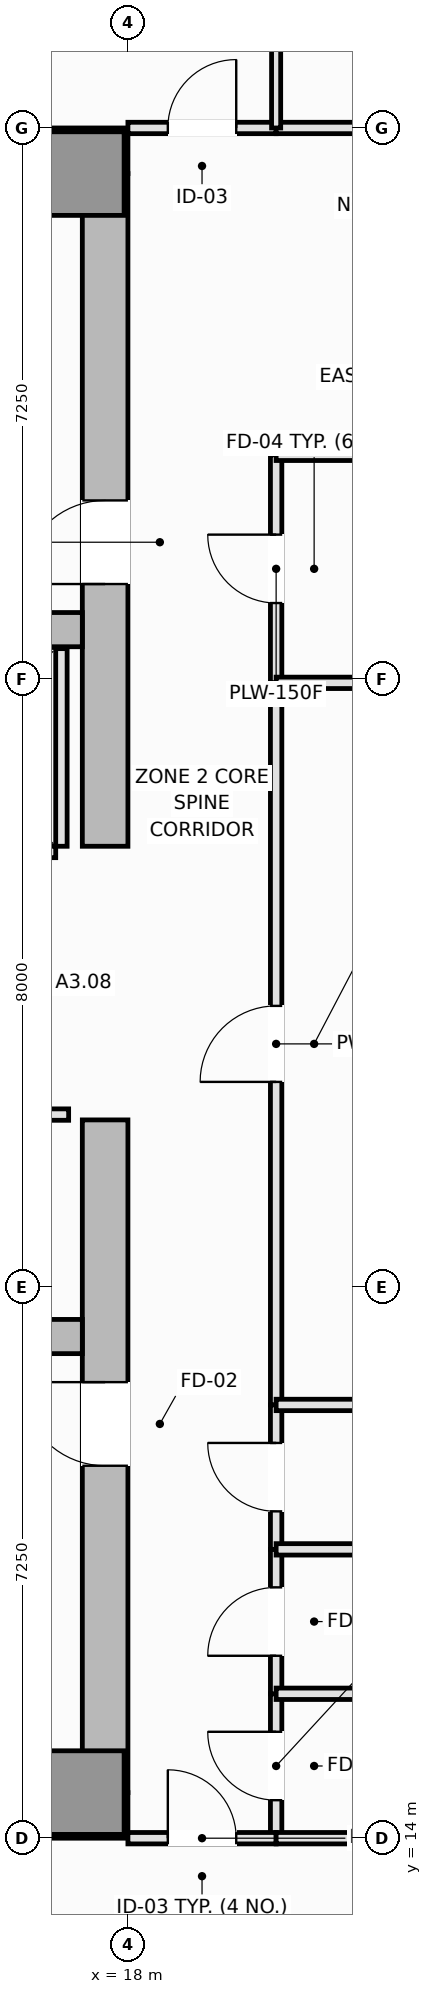
"""IFC4 building model, lengths in metres.
Left out: names, types, materials, properties, quantities, classifications, styles, units other than length and angle.
Written with IfcOpenShell. Run it as: python <this file> out.ifc"""

import sys

from ifc_helpers import new_model, si_unit, direction, frame, frame_2d, origin, origin_2d, place, context, subcontext, project, spatial, rectangle, extrude, element, fill, save


model = new_model("IFC4")
c1 = context("Model", 3, precision=1e-05, world=origin(), true_north=direction((0.0, 1.0)))
c2 = subcontext(c1, "Body", "Model", "MODEL_VIEW")
j1 = project(units=[si_unit("LENGTHUNIT", "METRE"), si_unit("PLANEANGLEUNIT", "RADIAN")], contexts=[c1])
p1 = place(None, origin())
s1 = spatial("IfcSite", under=j1, at=p1, CompositionType="ELEMENT")
p2 = place(p1, origin())
s2 = spatial("IfcBuilding", under=s1, at=p2, CompositionType="ELEMENT")
p3 = place(p2, frame((0.0, 0.0, 116.45)))
s3 = spatial("IfcBuildingStorey", under=s2, at=p3, CompositionType="ELEMENT", Elevation=116.45)
for number, where, z_axis, x_axis in (
    (1, (4.5, 14.3, 0.0), (0.0, 0.0, 1.0), (1.0, 0.0, 0.0)),
    (2, (4.5, 36.2, 0.0), (0.0, 0.0, 1.0), (1.0, 0.0, 0.0)),
):
    element("IfcWall", number, at=place(p3, frame(where, z_axis=z_axis, x_axis=x_axis)), inside=s3, PredefinedType="SHEAR", context=c2, shape_type="SweptSolid", body=[
        extrude(rectangle(XDim=13.5, YDim=0.6, at=frame_2d((6.75, 0.0))), origin(), (0.0, 0.0, 1.0), 3.55),
    ])
p4 = place(p3, frame((17.7, 14.6, 0.0), z_axis=(0.0, 0.0, 1.0), x_axis=(0.0, 1.0, 0.0)))
e3 = element("IfcWall", 3, at=p4, inside=s3, PredefinedType="SHEAR", context=c2, shape_type="SweptSolid", body=[
    extrude(rectangle(XDim=8.85, YDim=0.6, at=frame_2d((4.425, 0.0))), origin(), (0.0, 0.0, 1.0), 3.55),
])
p5 = place(p4, frame((4.3, 0.0, 0.0)))
e4 = element("IfcOpeningElement", 4, at=p5, cuts=e3, PredefinedType="OPENING", context=c2, shape_type="SweptSolid", body=[
    extrude(rectangle(XDim=1.1, YDim=2.15, at=frame_2d((0.55, 1.075))), frame((0.0, 0.31, 0.0), z_axis=(0.0, -1.0, 0.0), x_axis=(1.0, 0.0, 0.0)), (0.0, 0.0, 1.0), 0.62),
])
p6 = place(p3, frame((17.7, 27.05, 0.0), z_axis=(0.0, 0.0, 1.0), x_axis=(0.0, 1.0, 0.0)))
e5 = element("IfcWall", 5, at=p6, inside=s3, PredefinedType="SHEAR", context=c2, shape_type="SweptSolid", body=[
    extrude(rectangle(XDim=8.85, YDim=0.6, at=frame_2d((4.425, 0.0))), origin(), (0.0, 0.0, 1.0), 3.55),
])
p7 = place(p6, frame((3.45, 0.0, 0.0)))
e6 = element("IfcOpeningElement", 6, at=p7, cuts=e5, PredefinedType="OPENING", context=c2, shape_type="SweptSolid", body=[
    extrude(rectangle(XDim=1.1, YDim=2.15, at=frame_2d((0.55, 1.075))), frame((0.0, 0.31, 0.0), z_axis=(0.0, -1.0, 0.0), x_axis=(1.0, 0.0, 0.0)), (0.0, 0.0, 1.0), 0.62),
])
for number, where, z_axis, x_axis in (
    (7, (5.1, 20.6, 0.0), (0.0, 0.0, 1.0), (1.0, 0.0, 0.0)),
    (8, (5.1, 29.9, 0.0), (0.0, 0.0, 1.0), (1.0, 0.0, 0.0)),
):
    element("IfcWall", number, at=place(p3, frame(where, z_axis=z_axis, x_axis=x_axis)), inside=s3, PredefinedType="SHEAR", context=c2, shape_type="SweptSolid", body=[
        extrude(rectangle(XDim=12.3, YDim=0.45, at=frame_2d((6.15, 0.0))), origin(), (0.0, 0.0, 1.0), 3.55),
    ])
for number, where, z_axis, x_axis in (
    (9, (17.4, 14.6, 0.0), (0.0, 0.0, 1.0), (1.0, 0.0, 0.0)),
    (10, (17.4, 35.9, 0.0), (0.0, 0.0, 1.0), (1.0, 0.0, 0.0)),
):
    element("IfcColumn", number, at=place(p3, frame(where, z_axis=z_axis, x_axis=x_axis)), inside=s3, PredefinedType="PILASTER", context=c2, shape_type="SweptSolid", body=[
        extrude(rectangle(XDim=1.1, YDim=1.1, at=origin_2d()), origin(), (0.0, 0.0, 1.0), 3.55),
    ])
p8 = place(p3, frame((14.5, 26.975, 0.0), z_axis=(0.0, 0.0, 1.0), x_axis=(1.0, 0.0, 0.0)))
e11 = element("IfcWall", 11, at=p8, inside=s3, PredefinedType="PARTITIONING", context=c2, shape_type="SweptSolid", body=[
    extrude(rectangle(XDim=2.55, YDim=0.15, at=frame_2d((1.275, 0.0))), origin(), (0.0, 0.0, 1.0), 3.37),
])
p9 = place(p8, frame((0.625, 0.0, 0.0)))
e12 = element("IfcOpeningElement", 12, at=p9, cuts=e11, PredefinedType="OPENING", context=c2, shape_type="SweptSolid", body=[
    extrude(rectangle(XDim=1.3, YDim=2.2, at=frame_2d((0.65, 1.1))), frame((0.0, 0.085, 0.0), z_axis=(0.0, -1.0, 0.0), x_axis=(1.0, 0.0, 0.0)), (0.0, 0.0, 1.0), 0.17),
])
p10 = place(p3, frame((17.125, 27.05, 0.0), z_axis=(0.0, 0.0, 1.0), x_axis=(0.0, 1.0, 0.0)))
e13 = element("IfcWall", 13, at=p10, inside=s3, PredefinedType="PARTITIONING", context=c2, shape_type="SweptSolid", body=[
    extrude(rectangle(XDim=2.6, YDim=0.15, at=frame_2d((1.3, 0.0))), origin(), (0.0, 0.0, 1.0), 3.37),
])
p11 = place(p3, frame((14.33, 23.52, 0.0), z_axis=(0.0, 0.0, 1.0), x_axis=(1.0, 0.0, 0.0)))
e14 = element("IfcWall", 14, at=p11, inside=s3, PredefinedType="PARTITIONING", context=c2, shape_type="SweptSolid", body=[
    extrude(rectangle(XDim=2.89, YDim=0.15, at=frame_2d((1.445, 0.0))), origin(), (0.0, 0.0, 1.0), 3.37),
])
p12 = place(p11, frame((0.28, 0.0, 0.0)))
e15 = element("IfcOpeningElement", 15, at=p12, cuts=e14, PredefinedType="OPENING", context=c2, shape_type="SweptSolid", body=[
    extrude(rectangle(XDim=0.9, YDim=2.1, at=frame_2d((0.45, 1.05))), frame((0.0, 0.085, 0.0), z_axis=(0.0, -1.0, 0.0), x_axis=(1.0, 0.0, 0.0)), (0.0, 0.0, 1.0), 0.17),
])
p13 = place(p11, frame((1.71, 0.0, 0.0)))
e16 = element("IfcOpeningElement", 16, at=p13, cuts=e14, PredefinedType="OPENING", context=c2, shape_type="SweptSolid", body=[
    extrude(rectangle(XDim=0.9, YDim=2.1, at=frame_2d((0.45, 1.05))), frame((0.0, 0.085, 0.0), z_axis=(0.0, -1.0, 0.0), x_axis=(1.0, 0.0, 0.0)), (0.0, 0.0, 1.0), 0.17),
])
p14 = place(p3, frame((19.95, 29.2, 0.0), z_axis=(0.0, 0.0, 1.0), x_axis=(0.0, 1.0, 0.0)))
e17 = element("IfcWall", 17, at=p14, inside=s3, PredefinedType="PLUMBINGWALL", context=c2, shape_type="SweptSolid", body=[
    extrude(rectangle(XDim=3.0, YDim=0.15, at=frame_2d((1.5, 0.0))), origin(), (0.0, 0.0, 1.0), 3.37),
])
p15 = place(p14, frame((1.05, 0.0, 0.0)))
e18 = element("IfcOpeningElement", 18, at=p15, cuts=e17, PredefinedType="OPENING", context=c2, shape_type="SweptSolid", body=[
    extrude(rectangle(XDim=0.9, YDim=2.1, at=frame_2d((0.45, 1.05))), frame((0.0, 0.085, 0.0), z_axis=(0.0, -1.0, 0.0), x_axis=(1.0, 0.0, 0.0)), (0.0, 0.0, 1.0), 0.17),
])
p16 = place(p3, frame((19.95, 19.7, 0.0), z_axis=(0.0, 0.0, 1.0), x_axis=(0.0, 1.0, 0.0)))
e19 = element("IfcWall", 19, at=p16, inside=s3, PredefinedType="PARTITIONING", context=c2, shape_type="SweptSolid", body=[
    extrude(rectangle(XDim=9.5, YDim=0.15, at=frame_2d((4.75, 0.0))), origin(), (0.0, 0.0, 1.0), 3.37),
])
p17 = place(p16, frame((4.25, 0.0, 0.0)))
e20 = element("IfcOpeningElement", 20, at=p17, cuts=e19, PredefinedType="OPENING", context=c2, shape_type="SweptSolid", body=[
    extrude(rectangle(XDim=1.0, YDim=2.15, at=frame_2d((0.5, 1.075))), frame((0.0, 0.085, 0.0), z_axis=(0.0, -1.0, 0.0), x_axis=(1.0, 0.0, 0.0)), (0.0, 0.0, 1.0), 0.17),
])
p18 = place(p3, frame((19.95, 14.0, 0.0), z_axis=(0.0, 0.0, 1.0), x_axis=(0.0, 1.0, 0.0)))
e21 = element("IfcWall", 21, at=p18, inside=s3, PredefinedType="PLUMBINGWALL", context=c2, shape_type="SweptSolid", body=[
    extrude(rectangle(XDim=1.9, YDim=0.15, at=frame_2d((0.95, 0.0))), origin(), (0.0, 0.0, 1.0), 3.37),
])
p19 = place(p18, frame((0.5, 0.0, 0.0)))
e22 = element("IfcOpeningElement", 22, at=p19, cuts=e21, PredefinedType="OPENING", context=c2, shape_type="SweptSolid", body=[
    extrude(rectangle(XDim=0.9, YDim=2.1, at=frame_2d((0.45, 1.05))), frame((0.0, 0.085, 0.0), z_axis=(0.0, -1.0, 0.0), x_axis=(1.0, 0.0, 0.0)), (0.0, 0.0, 1.0), 0.17),
])
p20 = place(p3, frame((19.95, 15.9, 0.0), z_axis=(0.0, 0.0, 1.0), x_axis=(0.0, 1.0, 0.0)))
e23 = element("IfcWall", 23, at=p20, inside=s3, PredefinedType="PLUMBINGWALL", context=c2, shape_type="SweptSolid", body=[
    extrude(rectangle(XDim=1.9, YDim=0.15, at=frame_2d((0.95, 0.0))), origin(), (0.0, 0.0, 1.0), 3.37),
])
p21 = place(p20, frame((0.5, 0.0, 0.0)))
e24 = element("IfcOpeningElement", 24, at=p21, cuts=e23, PredefinedType="OPENING", context=c2, shape_type="SweptSolid", body=[
    extrude(rectangle(XDim=0.9, YDim=2.1, at=frame_2d((0.45, 1.05))), frame((0.0, 0.085, 0.0), z_axis=(0.0, -1.0, 0.0), x_axis=(1.0, 0.0, 0.0)), (0.0, 0.0, 1.0), 0.17),
])
p22 = place(p3, frame((19.95, 17.8, 0.0), z_axis=(0.0, 0.0, 1.0), x_axis=(0.0, 1.0, 0.0)))
e25 = element("IfcWall", 25, at=p22, inside=s3, PredefinedType="PLUMBINGWALL", context=c2, shape_type="SweptSolid", body=[
    extrude(rectangle(XDim=1.9, YDim=0.15, at=frame_2d((0.95, 0.0))), origin(), (0.0, 0.0, 1.0), 3.37),
])
p23 = place(p22, frame((0.5, 0.0, 0.0)))
e26 = element("IfcOpeningElement", 26, at=p23, cuts=e25, PredefinedType="OPENING", context=c2, shape_type="SweptSolid", body=[
    extrude(rectangle(XDim=0.9, YDim=2.1, at=frame_2d((0.45, 1.05))), frame((0.0, 0.085, 0.0), z_axis=(0.0, -1.0, 0.0), x_axis=(1.0, 0.0, 0.0)), (0.0, 0.0, 1.0), 0.17),
])
p24 = place(p3, frame((18.0, 14.0, 0.0), z_axis=(0.0, 0.0, 1.0), x_axis=(1.0, 0.0, 0.0)))
e27 = element("IfcWall", 27, at=p24, inside=s3, PredefinedType="PARTITIONING", context=c2, shape_type="SweptSolid", body=[
    extrude(rectangle(XDim=1.95, YDim=0.15, at=frame_2d((0.975, 0.0))), origin(), (0.0, 0.0, 1.0), 3.37),
])
p25 = place(p24, frame((0.525, 0.0, 0.0)))
e28 = element("IfcOpeningElement", 28, at=p25, cuts=e27, PredefinedType="OPENING", context=c2, shape_type="SweptSolid", body=[
    extrude(rectangle(XDim=0.9, YDim=2.1, at=frame_2d((0.45, 1.05))), frame((0.0, 0.085, 0.0), z_axis=(0.0, -1.0, 0.0), x_axis=(1.0, 0.0, 0.0)), (0.0, 0.0, 1.0), 0.17),
])
p26 = place(p3, frame((18.0, 36.5, 0.0), z_axis=(0.0, 0.0, 1.0), x_axis=(1.0, 0.0, 0.0)))
e29 = element("IfcWall", 29, at=p26, inside=s3, PredefinedType="PARTITIONING", context=c2, shape_type="SweptSolid", body=[
    extrude(rectangle(XDim=1.95, YDim=0.15, at=frame_2d((0.975, 0.0))), origin(), (0.0, 0.0, 1.0), 3.37),
])
p27 = place(p26, frame((0.525, 0.0, 0.0)))
e30 = element("IfcOpeningElement", 30, at=p27, cuts=e29, PredefinedType="OPENING", context=c2, shape_type="SweptSolid", body=[
    extrude(rectangle(XDim=0.9, YDim=2.1, at=frame_2d((0.45, 1.05))), frame((0.0, 0.085, 0.0), z_axis=(0.0, -1.0, 0.0), x_axis=(1.0, 0.0, 0.0)), (0.0, 0.0, 1.0), 0.17),
])
p28 = place(p3, frame((19.95, 32.2, 0.0), z_axis=(0.0, 0.0, 1.0), x_axis=(1.0, 0.0, 0.0)))
e31 = element("IfcWall", 31, at=p28, inside=s3, PredefinedType="PLUMBINGWALL", context=c2, shape_type="SweptSolid", body=[
    extrude(rectangle(XDim=3.25, YDim=0.15, at=frame_2d((1.625, 0.0))), origin(), (0.0, 0.0, 1.0), 3.37),
])
p29 = place(p3, frame((19.95, 36.5, 0.0), z_axis=(0.0, 0.0, 1.0), x_axis=(1.0, 0.0, 0.0)))
e32 = element("IfcWall", 32, at=p29, inside=s3, PredefinedType="PARTITIONING", context=c2, shape_type="SweptSolid", body=[
    extrude(rectangle(XDim=7.55, YDim=0.15, at=frame_2d((3.775, 0.0))), origin(), (0.0, 0.0, 1.0), 3.37),
])
p30 = place(p29, frame((3.275, 0.0, 0.0)))
e33 = element("IfcOpeningElement", 33, at=p30, cuts=e32, PredefinedType="OPENING", context=c2, shape_type="SweptSolid", body=[
    extrude(rectangle(XDim=1.0, YDim=2.15, at=frame_2d((0.5, 1.075))), frame((0.0, 0.085, 0.0), z_axis=(0.0, -1.0, 0.0), x_axis=(1.0, 0.0, 0.0)), (0.0, 0.0, 1.0), 0.17),
])
p31 = place(p3, frame((19.95, 29.2, 0.0), z_axis=(0.0, 0.0, 1.0), x_axis=(1.0, 0.0, 0.0)))
e34 = element("IfcWall", 34, at=p31, inside=s3, PredefinedType="PLUMBINGWALL", context=c2, shape_type="SweptSolid", body=[
    extrude(rectangle(XDim=3.25, YDim=0.15, at=frame_2d((1.625, 0.0))), origin(), (0.0, 0.0, 1.0), 3.37),
])
for number, where, z_axis, x_axis in (
    (35, (19.95, 19.7, 0.0), (0.0, 0.0, 1.0), (1.0, 0.0, 0.0)),
    (36, (19.95, 15.9, 0.0), (0.0, 0.0, 1.0), (1.0, 0.0, 0.0)),
    (37, (19.95, 14.0, 0.0), (0.0, 0.0, 1.0), (1.0, 0.0, 0.0)),
    (38, (19.95, 17.8, 0.0), (0.0, 0.0, 1.0), (1.0, 0.0, 0.0)),
):
    element("IfcWall", number, at=place(p3, frame(where, z_axis=z_axis, x_axis=x_axis)), inside=s3, PredefinedType="PLUMBINGWALL", context=c2, shape_type="SweptSolid", body=[
        extrude(rectangle(XDim=7.55, YDim=0.15, at=frame_2d((3.775, 0.0))), origin(), (0.0, 0.0, 1.0), 3.37),
    ])
p32 = place(p3, frame((19.95, 36.5, 0.0), z_axis=(0.0, 0.0, 1.0), x_axis=(0.0, 1.0, 0.0)))
e39 = element("IfcWall", 39, at=p32, inside=s3, PredefinedType="PARTITIONING", context=c2, shape_type="SweptSolid", body=[
    extrude(rectangle(XDim=9.99, YDim=0.12, at=frame_2d((4.995, 0.0))), origin(), (0.0, 0.0, 1.0), 3.37),
])
p33 = place(p5, origin())
e40 = element("IfcDoor", 40, at=p33, inside=s3, OperationType="SINGLE_SWING_RIGHT", PredefinedType="DOOR", context=c2, shape_type="SweptSolid", body=[
    extrude(rectangle(XDim=1.1, YDim=2.15, at=frame_2d((0.55, 1.075))), frame((0.0, 0.025, 0.0), z_axis=(0.0, -1.0, 0.0), x_axis=(1.0, 0.0, 0.0)), (0.0, 0.0, 1.0), 0.05),
])
fill(e4, e40)
p34 = place(p7, origin())
e41 = element("IfcDoor", 41, at=p34, inside=s3, OperationType="SINGLE_SWING_LEFT", PredefinedType="DOOR", context=c2, shape_type="SweptSolid", body=[
    extrude(rectangle(XDim=1.1, YDim=2.15, at=frame_2d((0.55, 1.075))), frame((0.0, 0.025, 0.0), z_axis=(0.0, -1.0, 0.0), x_axis=(1.0, 0.0, 0.0)), (0.0, 0.0, 1.0), 0.05),
])
fill(e6, e41)
p35 = place(p15, origin())
e42 = element("IfcDoor", 42, at=p35, inside=s3, OperationType="SINGLE_SWING_RIGHT", PredefinedType="DOOR", context=c2, shape_type="SweptSolid", body=[
    extrude(rectangle(XDim=0.9, YDim=2.1, at=frame_2d((0.45, 1.05))), frame((0.0, 0.025, 0.0), z_axis=(0.0, -1.0, 0.0), x_axis=(1.0, 0.0, 0.0)), (0.0, 0.0, 1.0), 0.05),
])
fill(e18, e42)
p36 = place(p17, origin())
e43 = element("IfcDoor", 43, at=p36, inside=s3, OperationType="SINGLE_SWING_LEFT", PredefinedType="DOOR", context=c2, shape_type="SweptSolid", body=[
    extrude(rectangle(XDim=1.0, YDim=2.15, at=frame_2d((0.5, 1.075))), frame((0.0, 0.025, 0.0), z_axis=(0.0, -1.0, 0.0), x_axis=(1.0, 0.0, 0.0)), (0.0, 0.0, 1.0), 0.05),
])
fill(e20, e43)
p37 = place(p19, origin())
e44 = element("IfcDoor", 44, at=p37, inside=s3, OperationType="SINGLE_SWING_RIGHT", PredefinedType="DOOR", context=c2, shape_type="SweptSolid", body=[
    extrude(rectangle(XDim=0.9, YDim=2.1, at=frame_2d((0.45, 1.05))), frame((0.0, 0.025, 0.0), z_axis=(0.0, -1.0, 0.0), x_axis=(1.0, 0.0, 0.0)), (0.0, 0.0, 1.0), 0.05),
])
fill(e22, e44)
p38 = place(p21, origin())
e45 = element("IfcDoor", 45, at=p38, inside=s3, OperationType="SINGLE_SWING_LEFT", PredefinedType="DOOR", context=c2, shape_type="SweptSolid", body=[
    extrude(rectangle(XDim=0.9, YDim=2.1, at=frame_2d((0.45, 1.05))), frame((0.0, 0.025, 0.0), z_axis=(0.0, -1.0, 0.0), x_axis=(1.0, 0.0, 0.0)), (0.0, 0.0, 1.0), 0.05),
])
fill(e24, e45)
p39 = place(p23, origin())
e46 = element("IfcDoor", 46, at=p39, inside=s3, OperationType="SINGLE_SWING_RIGHT", PredefinedType="DOOR", context=c2, shape_type="SweptSolid", body=[
    extrude(rectangle(XDim=0.9, YDim=2.1, at=frame_2d((0.45, 1.05))), frame((0.0, 0.025, 0.0), z_axis=(0.0, -1.0, 0.0), x_axis=(1.0, 0.0, 0.0)), (0.0, 0.0, 1.0), 0.05),
])
fill(e26, e46)
p40 = place(p25, origin())
e47 = element("IfcDoor", 47, at=p40, inside=s3, OperationType="SINGLE_SWING_LEFT", PredefinedType="DOOR", context=c2, shape_type="SweptSolid", body=[
    extrude(rectangle(XDim=0.9, YDim=2.1, at=frame_2d((0.45, 1.05))), frame((0.0, 0.025, 0.0), z_axis=(0.0, -1.0, 0.0), x_axis=(1.0, 0.0, 0.0)), (0.0, 0.0, 1.0), 0.05),
])
fill(e28, e47)
p41 = place(p27, origin())
e48 = element("IfcDoor", 48, at=p41, inside=s3, OperationType="SINGLE_SWING_RIGHT", PredefinedType="DOOR", context=c2, shape_type="SweptSolid", body=[
    extrude(rectangle(XDim=0.9, YDim=2.1, at=frame_2d((0.45, 1.05))), frame((0.0, 0.025, 0.0), z_axis=(0.0, -1.0, 0.0), x_axis=(1.0, 0.0, 0.0)), (0.0, 0.0, 1.0), 0.05),
])
fill(e30, e48)
save(model, sys.argv[1])
